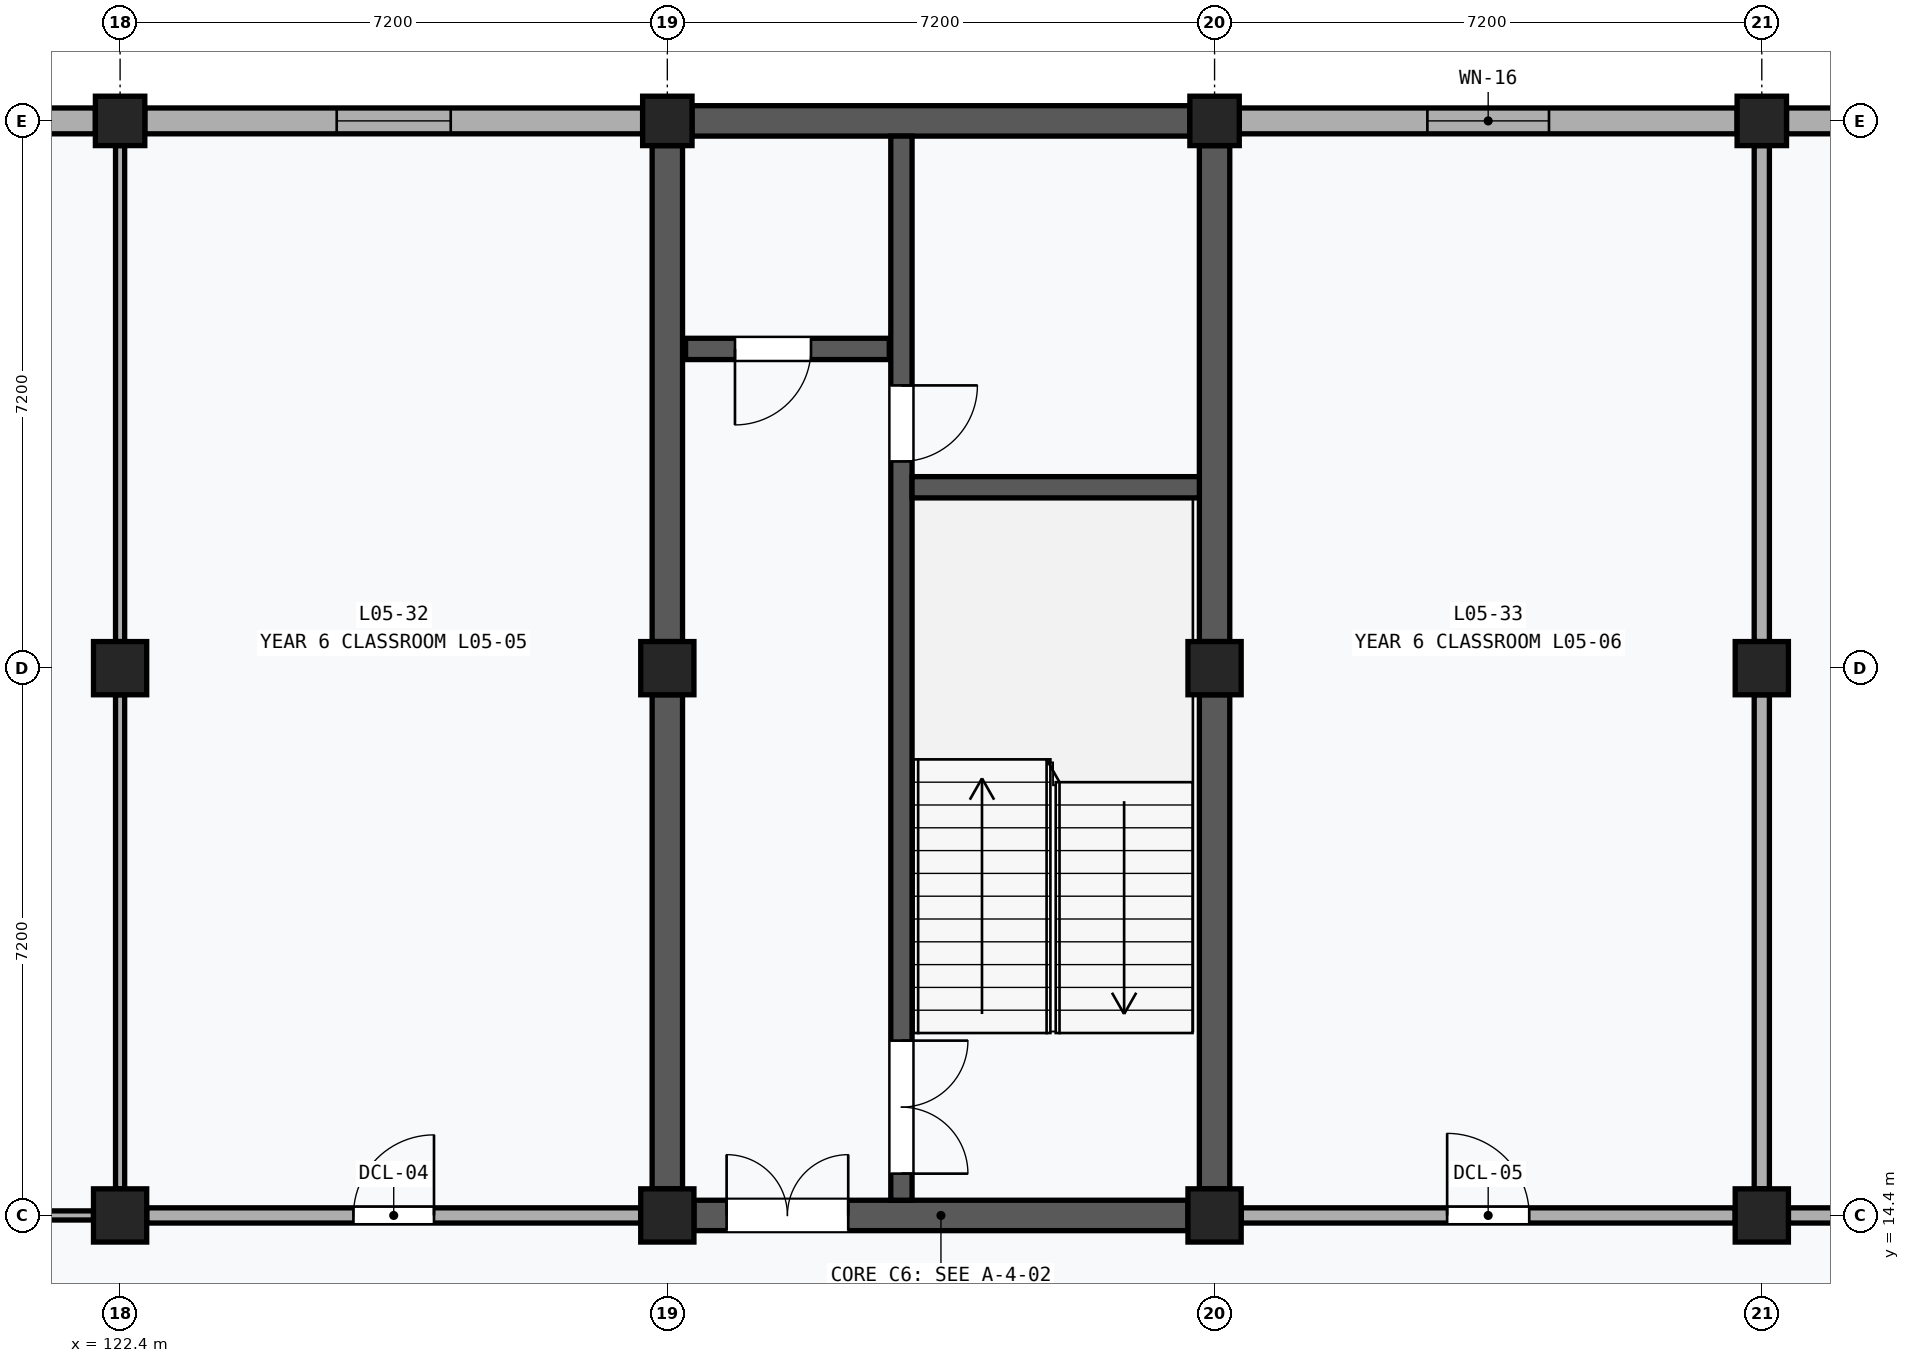
"""IFC4 building model, lengths in metres.
Left out: names, types, materials, properties, quantities, classifications, styles, units other than length and angle.
Written with IfcOpenShell. Run it as: python <this file> out.ifc"""

import sys

from ifc_helpers import new_model, si_unit, direction, frame, frame_2d, origin, origin_2d, place, context, subcontext, project, spatial, rectangle, extrude, element, fill, save


model = new_model("IFC4")
c1 = context("Model", 3, precision=1e-05, world=origin(), true_north=direction((0.0, 1.0)))
c2 = subcontext(c1, "Body", "Model", "MODEL_VIEW")
j1 = project(units=[si_unit("LENGTHUNIT", "METRE"), si_unit("PLANEANGLEUNIT", "RADIAN")], contexts=[c1])
p1 = place(None, origin())
s1 = spatial("IfcSite", under=j1, at=p1, CompositionType="ELEMENT")
p2 = place(p1, origin())
s2 = spatial("IfcBuilding", under=s1, at=p2, CompositionType="ELEMENT")
p3 = place(p2, frame((0.0, 0.0, 22.6)))
s3 = spatial("IfcBuildingStorey", under=s2, at=p3, CompositionType="ELEMENT", Elevation=22.6)
for number, where, z_axis, x_axis in (
    (1, (122.4, 14.4, 0.0), (0.0, 0.0, 1.0), (1.0, 0.0, 0.0)),
    (2, (122.4, 21.6, 0.0), (0.0, 0.0, 1.0), (1.0, 0.0, 0.0)),
):
    element("IfcColumn", number, at=place(p3, frame(where, z_axis=z_axis, x_axis=x_axis)), inside=s3, PredefinedType="COLUMN", context=c2, shape_type="SweptSolid", body=[
        extrude(rectangle(XDim=0.7, YDim=0.7, at=origin_2d()), origin(), (0.0, 0.0, 1.0), 4.0),
    ])
p4 = place(p3, frame((122.4, 28.8, 0.0), z_axis=(0.0, 0.0, 1.0), x_axis=(1.0, 0.0, 0.0)))
e3 = element("IfcColumn", 3, at=p4, inside=s3, PredefinedType="COLUMN", context=c2, shape_type="SweptSolid", body=[
    extrude(rectangle(XDim=0.65, YDim=0.65, at=origin_2d()), origin(), (0.0, 0.0, 1.0), 4.0),
])
for number, where, z_axis, x_axis in (
    (4, (129.6, 14.4, 0.0), (0.0, 0.0, 1.0), (1.0, 0.0, 0.0)),
    (5, (129.6, 21.6, 0.0), (0.0, 0.0, 1.0), (1.0, 0.0, 0.0)),
):
    element("IfcColumn", number, at=place(p3, frame(where, z_axis=z_axis, x_axis=x_axis)), inside=s3, PredefinedType="COLUMN", context=c2, shape_type="SweptSolid", body=[
        extrude(rectangle(XDim=0.7, YDim=0.7, at=origin_2d()), origin(), (0.0, 0.0, 1.0), 4.0),
    ])
p5 = place(p3, frame((129.6, 28.8, 0.0), z_axis=(0.0, 0.0, 1.0), x_axis=(1.0, 0.0, 0.0)))
e6 = element("IfcColumn", 6, at=p5, inside=s3, PredefinedType="COLUMN", context=c2, shape_type="SweptSolid", body=[
    extrude(rectangle(XDim=0.65, YDim=0.65, at=origin_2d()), origin(), (0.0, 0.0, 1.0), 4.0),
])
for number, where, z_axis, x_axis in (
    (7, (136.8, 14.4, 0.0), (0.0, 0.0, 1.0), (1.0, 0.0, 0.0)),
    (8, (136.8, 21.6, 0.0), (0.0, 0.0, 1.0), (1.0, 0.0, 0.0)),
):
    element("IfcColumn", number, at=place(p3, frame(where, z_axis=z_axis, x_axis=x_axis)), inside=s3, PredefinedType="COLUMN", context=c2, shape_type="SweptSolid", body=[
        extrude(rectangle(XDim=0.7, YDim=0.7, at=origin_2d()), origin(), (0.0, 0.0, 1.0), 4.0),
    ])
p6 = place(p3, frame((136.8, 28.8, 0.0), z_axis=(0.0, 0.0, 1.0), x_axis=(1.0, 0.0, 0.0)))
e9 = element("IfcColumn", 9, at=p6, inside=s3, PredefinedType="COLUMN", context=c2, shape_type="SweptSolid", body=[
    extrude(rectangle(XDim=0.65, YDim=0.65, at=origin_2d()), origin(), (0.0, 0.0, 1.0), 4.0),
])
for number, where, z_axis, x_axis in (
    (10, (144.0, 14.4, 0.0), (0.0, 0.0, 1.0), (1.0, 0.0, 0.0)),
    (11, (144.0, 21.6, 0.0), (0.0, 0.0, 1.0), (1.0, 0.0, 0.0)),
):
    element("IfcColumn", number, at=place(p3, frame(where, z_axis=z_axis, x_axis=x_axis)), inside=s3, PredefinedType="COLUMN", context=c2, shape_type="SweptSolid", body=[
        extrude(rectangle(XDim=0.7, YDim=0.7, at=origin_2d()), origin(), (0.0, 0.0, 1.0), 4.0),
    ])
p7 = place(p3, frame((144.0, 28.8, 0.0), z_axis=(0.0, 0.0, 1.0), x_axis=(1.0, 0.0, 0.0)))
e12 = element("IfcColumn", 12, at=p7, inside=s3, PredefinedType="COLUMN", context=c2, shape_type="SweptSolid", body=[
    extrude(rectangle(XDim=0.65, YDim=0.65, at=origin_2d()), origin(), (0.0, 0.0, 1.0), 4.0),
])
p8 = place(p3, frame((115.45, 28.8, 0.0), z_axis=(0.0, 0.0, 1.0), x_axis=(1.0, 0.0, 0.0)))
e13 = element("IfcWall", 13, at=p8, inside=s3, PredefinedType="SOLIDWALL", context=c2, shape_type="SweptSolid", body=[
    extrude(rectangle(XDim=6.625, YDim=0.34, at=frame_2d((3.312, 0.0))), origin(), (0.0, 0.0, 1.0), 3.12),
])
p9 = place(p8, frame((2.562, 0.0, 1.1)))
e14 = element("IfcOpeningElement", 14, at=p9, cuts=e13, PredefinedType="OPENING", context=c2, shape_type="SweptSolid", body=[
    extrude(rectangle(XDim=1.5, YDim=1.35, at=frame_2d((0.75, 0.675))), frame((0.0, 0.182, 0.0), z_axis=(0.0, -1.0, 0.0), x_axis=(1.0, 0.0, 0.0)), (0.0, 0.0, 1.0), 0.364),
])
p10 = place(p3, frame((122.725, 28.8, 0.0), z_axis=(0.0, 0.0, 1.0), x_axis=(1.0, 0.0, 0.0)))
e15 = element("IfcWall", 15, at=p10, inside=s3, PredefinedType="SOLIDWALL", context=c2, shape_type="SweptSolid", body=[
    extrude(rectangle(XDim=6.55, YDim=0.34, at=frame_2d((3.275, 0.0))), origin(), (0.0, 0.0, 1.0), 3.12),
])
p11 = place(p10, frame((2.525, 0.0, 1.1)))
e16 = element("IfcOpeningElement", 16, at=p11, cuts=e15, PredefinedType="OPENING", context=c2, shape_type="SweptSolid", body=[
    extrude(rectangle(XDim=1.5, YDim=1.35, at=frame_2d((0.75, 0.675))), frame((0.0, 0.182, 0.0), z_axis=(0.0, -1.0, 0.0), x_axis=(1.0, 0.0, 0.0)), (0.0, 0.0, 1.0), 0.364),
])
p12 = place(p3, frame((137.125, 28.8, 0.0), z_axis=(0.0, 0.0, 1.0), x_axis=(1.0, 0.0, 0.0)))
e17 = element("IfcWall", 17, at=p12, inside=s3, PredefinedType="SOLIDWALL", context=c2, shape_type="SweptSolid", body=[
    extrude(rectangle(XDim=6.55, YDim=0.34, at=frame_2d((3.275, 0.0))), origin(), (0.0, 0.0, 1.0), 3.12),
])
p13 = place(p12, frame((2.475, 0.0, 1.1)))
e18 = element("IfcOpeningElement", 18, at=p13, cuts=e17, PredefinedType="OPENING", context=c2, shape_type="SweptSolid", body=[
    extrude(rectangle(XDim=1.6, YDim=1.5, at=frame_2d((0.8, 0.75))), frame((0.0, 0.182, 0.0), z_axis=(0.0, -1.0, 0.0), x_axis=(1.0, 0.0, 0.0)), (0.0, 0.0, 1.0), 0.364),
])
p14 = place(p3, frame((144.325, 28.8, 0.0), z_axis=(0.0, 0.0, 1.0), x_axis=(1.0, 0.0, 0.0)))
e19 = element("IfcWall", 19, at=p14, inside=s3, PredefinedType="SOLIDWALL", context=c2, shape_type="SweptSolid", body=[
    extrude(rectangle(XDim=6.625, YDim=0.34, at=frame_2d((3.312, 0.0))), origin(), (0.0, 0.0, 1.0), 3.12),
])
p15 = place(p14, frame((2.363, 0.0, 1.1)))
e20 = element("IfcOpeningElement", 20, at=p15, cuts=e19, PredefinedType="OPENING", context=c2, shape_type="SweptSolid", body=[
    extrude(rectangle(XDim=1.9, YDim=1.5, at=frame_2d((0.95, 0.75))), frame((0.0, 0.182, 0.0), z_axis=(0.0, -1.0, 0.0), x_axis=(1.0, 0.0, 0.0)), (0.0, 0.0, 1.0), 0.364),
])
p16 = place(p3, frame((129.6, 14.75, 0.0), z_axis=(0.0, 0.0, 1.0), x_axis=(0.0, 1.0, 0.0)))
e21 = element("IfcWall", 21, at=p16, inside=s3, PredefinedType="SHEAR", context=c2, shape_type="SweptSolid", body=[
    extrude(rectangle(XDim=6.5, YDim=0.4, at=frame_2d((3.25, 0.0))), origin(), (0.0, 0.0, 1.0), 2.98),
])
p17 = place(p3, frame((129.6, 21.95, 0.0), z_axis=(0.0, 0.0, 1.0), x_axis=(0.0, 1.0, 0.0)))
e22 = element("IfcWall", 22, at=p17, inside=s3, PredefinedType="SHEAR", context=c2, shape_type="SweptSolid", body=[
    extrude(rectangle(XDim=6.525, YDim=0.4, at=frame_2d((3.263, 0.0))), origin(), (0.0, 0.0, 1.0), 2.98),
])
p18 = place(p3, frame((136.8, 14.75, 0.0), z_axis=(0.0, 0.0, 1.0), x_axis=(0.0, 1.0, 0.0)))
e23 = element("IfcWall", 23, at=p18, inside=s3, PredefinedType="SHEAR", context=c2, shape_type="SweptSolid", body=[
    extrude(rectangle(XDim=6.5, YDim=0.4, at=frame_2d((3.25, 0.0))), origin(), (0.0, 0.0, 1.0), 2.98),
])
p19 = place(p3, frame((136.8, 21.95, 0.0), z_axis=(0.0, 0.0, 1.0), x_axis=(0.0, 1.0, 0.0)))
e24 = element("IfcWall", 24, at=p19, inside=s3, PredefinedType="SHEAR", context=c2, shape_type="SweptSolid", body=[
    extrude(rectangle(XDim=6.525, YDim=0.4, at=frame_2d((3.263, 0.0))), origin(), (0.0, 0.0, 1.0), 2.98),
])
p20 = place(p3, frame((129.95, 14.4, 0.0), z_axis=(0.0, 0.0, 1.0), x_axis=(1.0, 0.0, 0.0)))
e25 = element("IfcWall", 25, at=p20, inside=s3, PredefinedType="SHEAR", context=c2, shape_type="SweptSolid", body=[
    extrude(rectangle(XDim=6.5, YDim=0.4, at=frame_2d((3.25, 0.0))), origin(), (0.0, 0.0, 1.0), 3.05),
])
p21 = place(p20, frame((0.43, 0.0, 0.0)))
e26 = element("IfcOpeningElement", 26, at=p21, cuts=e25, PredefinedType="OPENING", context=c2, shape_type="SweptSolid", body=[
    extrude(rectangle(XDim=1.6, YDim=2.2, at=frame_2d((0.8, 1.1))), frame((0.0, 0.212, 0.0), z_axis=(0.0, -1.0, 0.0), x_axis=(1.0, 0.0, 0.0)), (0.0, 0.0, 1.0), 0.424),
])
p22 = place(p3, frame((129.925, 28.8, 0.0), z_axis=(0.0, 0.0, 1.0), x_axis=(1.0, 0.0, 0.0)))
e27 = element("IfcWall", 27, at=p22, inside=s3, PredefinedType="SHEAR", context=c2, shape_type="SweptSolid", body=[
    extrude(rectangle(XDim=6.55, YDim=0.4, at=frame_2d((3.275, 0.0))), origin(), (0.0, 0.0, 1.0), 3.12),
])
p23 = place(p3, frame((132.68, 14.6, 0.0), z_axis=(0.0, 0.0, 1.0), x_axis=(0.0, 1.0, 0.0)))
e28 = element("IfcWall", 28, at=p23, inside=s3, PredefinedType="SHEAR", context=c2, shape_type="SweptSolid", body=[
    extrude(rectangle(XDim=14.0, YDim=0.28, at=frame_2d((7.0, 0.0))), origin(), (0.0, 0.0, 1.0), 3.75),
])
p24 = place(p23, frame((0.35, 0.0, 0.0)))
e29 = element("IfcOpeningElement", 29, at=p24, cuts=e28, PredefinedType="OPENING", context=c2, shape_type="SweptSolid", body=[
    extrude(rectangle(XDim=1.75, YDim=2.15, at=frame_2d((0.875, 1.075))), frame((0.0, 0.152, 0.0), z_axis=(0.0, -1.0, 0.0), x_axis=(1.0, 0.0, 0.0)), (0.0, 0.0, 1.0), 0.304),
])
p25 = place(p23, frame((9.72, 0.0, 0.0)))
e30 = element("IfcOpeningElement", 30, at=p25, cuts=e28, PredefinedType="OPENING", context=c2, shape_type="SweptSolid", body=[
    extrude(rectangle(XDim=1.0, YDim=2.15, at=frame_2d((0.5, 1.075))), frame((0.0, 0.152, 0.0), z_axis=(0.0, -1.0, 0.0), x_axis=(1.0, 0.0, 0.0)), (0.0, 0.0, 1.0), 0.304),
])
p26 = place(p3, frame((132.82, 23.98, 0.0), z_axis=(0.0, 0.0, 1.0), x_axis=(1.0, 0.0, 0.0)))
e31 = element("IfcWall", 31, at=p26, inside=s3, PredefinedType="SHEAR", context=c2, shape_type="SweptSolid", body=[
    extrude(rectangle(XDim=3.78, YDim=0.28, at=frame_2d((1.89, 0.0))), origin(), (0.0, 0.0, 1.0), 3.75),
])
p27 = place(p3, frame((129.84, 25.8, 0.0), z_axis=(0.0, 0.0, 1.0), x_axis=(1.0, 0.0, 0.0)))
e32 = element("IfcWall", 32, at=p27, inside=s3, PredefinedType="SHEAR", context=c2, shape_type="SweptSolid", body=[
    extrude(rectangle(XDim=2.68, YDim=0.28, at=frame_2d((1.34, 0.0))), origin(), (0.0, 0.0, 1.0), 3.75),
])
p28 = place(p27, frame((0.65, 0.0, 0.0)))
e33 = element("IfcOpeningElement", 33, at=p28, cuts=e32, PredefinedType="OPENING", context=c2, shape_type="SweptSolid", body=[
    extrude(rectangle(XDim=1.0, YDim=2.15, at=frame_2d((0.5, 1.075))), frame((0.0, 0.152, 0.0), z_axis=(0.0, -1.0, 0.0), x_axis=(1.0, 0.0, 0.0)), (0.0, 0.0, 1.0), 0.304),
])
p29 = place(p3, frame((115.55, 14.4, 0.0), z_axis=(0.0, 0.0, 1.0), x_axis=(1.0, 0.0, 0.0)))
e34 = element("IfcWall", 34, at=p29, inside=s3, PredefinedType="MOVABLE", context=c2, shape_type="SweptSolid", body=[
    extrude(rectangle(XDim=6.5, YDim=0.12, at=frame_2d((3.25, 0.0))), origin(), (0.0, 0.0, 1.0), 2.98),
])
p30 = place(p29, frame((2.73, 0.0, 0.0)))
e35 = element("IfcOpeningElement", 35, at=p30, cuts=e34, PredefinedType="OPENING", context=c2, shape_type="SweptSolid", body=[
    extrude(rectangle(XDim=1.04, YDim=2.14, at=frame_2d((0.52, 1.07))), frame((0.0, 0.072, 0.0), z_axis=(0.0, -1.0, 0.0), x_axis=(1.0, 0.0, 0.0)), (0.0, 0.0, 1.0), 0.144),
])
p31 = place(p3, frame((122.4, 14.75, 0.0), z_axis=(0.0, 0.0, 1.0), x_axis=(0.0, 1.0, 0.0)))
e36 = element("IfcWall", 36, at=p31, inside=s3, PredefinedType="MOVABLE", context=c2, shape_type="SweptSolid", body=[
    extrude(rectangle(XDim=6.5, YDim=0.12, at=frame_2d((3.25, 0.0))), origin(), (0.0, 0.0, 1.0), 2.98),
])
p32 = place(p3, frame((122.4, 21.95, 0.0), z_axis=(0.0, 0.0, 1.0), x_axis=(0.0, 1.0, 0.0)))
e37 = element("IfcWall", 37, at=p32, inside=s3, PredefinedType="MOVABLE", context=c2, shape_type="SweptSolid", body=[
    extrude(rectangle(XDim=6.525, YDim=0.12, at=frame_2d((3.263, 0.0))), origin(), (0.0, 0.0, 1.0), 2.98),
])
p33 = place(p3, frame((122.75, 14.4, 0.0), z_axis=(0.0, 0.0, 1.0), x_axis=(1.0, 0.0, 0.0)))
e38 = element("IfcWall", 38, at=p33, inside=s3, PredefinedType="PARTITIONING", context=c2, shape_type="SweptSolid", body=[
    extrude(rectangle(XDim=6.5, YDim=0.2, at=frame_2d((3.25, 0.0))), origin(), (0.0, 0.0, 1.0), 2.98),
])
p34 = place(p33, frame((2.72, 0.0, 0.0)))
e39 = element("IfcOpeningElement", 39, at=p34, cuts=e38, PredefinedType="OPENING", context=c2, shape_type="SweptSolid", body=[
    extrude(rectangle(XDim=1.06, YDim=2.16, at=frame_2d((0.53, 1.08))), frame((0.0, 0.112, 0.0), z_axis=(0.0, -1.0, 0.0), x_axis=(1.0, 0.0, 0.0)), (0.0, 0.0, 1.0), 0.224),
])
p35 = place(p3, frame((137.15, 14.4, 0.0), z_axis=(0.0, 0.0, 1.0), x_axis=(1.0, 0.0, 0.0)))
e40 = element("IfcWall", 40, at=p35, inside=s3, PredefinedType="PARTITIONING", context=c2, shape_type="SweptSolid", body=[
    extrude(rectangle(XDim=6.5, YDim=0.2, at=frame_2d((3.25, 0.0))), origin(), (0.0, 0.0, 1.0), 2.98),
])
p36 = place(p35, frame((2.71, 0.0, 0.0)))
e41 = element("IfcOpeningElement", 41, at=p36, cuts=e40, PredefinedType="OPENING", context=c2, shape_type="SweptSolid", body=[
    extrude(rectangle(XDim=1.08, YDim=2.18, at=frame_2d((0.54, 1.09))), frame((0.0, 0.112, 0.0), z_axis=(0.0, -1.0, 0.0), x_axis=(1.0, 0.0, 0.0)), (0.0, 0.0, 1.0), 0.224),
])
p37 = place(p3, frame((144.0, 14.75, 0.0), z_axis=(0.0, 0.0, 1.0), x_axis=(0.0, 1.0, 0.0)))
e42 = element("IfcWall", 42, at=p37, inside=s3, PredefinedType="PARTITIONING", context=c2, shape_type="SweptSolid", body=[
    extrude(rectangle(XDim=6.5, YDim=0.2, at=frame_2d((3.25, 0.0))), origin(), (0.0, 0.0, 1.0), 2.98),
])
p38 = place(p3, frame((144.0, 21.95, 0.0), z_axis=(0.0, 0.0, 1.0), x_axis=(0.0, 1.0, 0.0)))
e43 = element("IfcWall", 43, at=p38, inside=s3, PredefinedType="PARTITIONING", context=c2, shape_type="SweptSolid", body=[
    extrude(rectangle(XDim=6.525, YDim=0.2, at=frame_2d((3.263, 0.0))), origin(), (0.0, 0.0, 1.0), 2.98),
])
p39 = place(p3, frame((144.35, 14.4, 0.0), z_axis=(0.0, 0.0, 1.0), x_axis=(1.0, 0.0, 0.0)))
e44 = element("IfcWall", 44, at=p39, inside=s3, PredefinedType="PARTITIONING", context=c2, shape_type="SweptSolid", body=[
    extrude(rectangle(XDim=6.525, YDim=0.2, at=frame_2d((3.262, 0.0))), origin(), (0.0, 0.0, 1.0), 2.98),
])
p40 = place(p39, frame((2.702, 0.0, 0.0)))
e45 = element("IfcOpeningElement", 45, at=p40, cuts=e44, PredefinedType="OPENING", context=c2, shape_type="SweptSolid", body=[
    extrude(rectangle(XDim=1.12, YDim=2.2, at=frame_2d((0.56, 1.1))), frame((0.0, 0.112, 0.0), z_axis=(0.0, -1.0, 0.0), x_axis=(1.0, 0.0, 0.0)), (0.0, 0.0, 1.0), 0.224),
])
p41 = place(p11, origin())
e46 = element("IfcWindow", 46, at=p41, inside=s3, PartitioningType="SINGLE_PANEL", PredefinedType="WINDOW", context=c2, shape_type="SweptSolid", body=[
    extrude(rectangle(XDim=1.5, YDim=1.35, at=frame_2d((0.75, 0.675))), frame((0.0, 0.03, 0.0), z_axis=(0.0, -1.0, 0.0), x_axis=(1.0, 0.0, 0.0)), (0.0, 0.0, 1.0), 0.06),
])
fill(e16, e46)
p42 = place(p13, origin())
e47 = element("IfcWindow", 47, at=p42, inside=s3, PartitioningType="SINGLE_PANEL", PredefinedType="WINDOW", context=c2, shape_type="SweptSolid", body=[
    extrude(rectangle(XDim=1.6, YDim=1.5, at=frame_2d((0.8, 0.75))), frame((0.0, 0.03, 0.0), z_axis=(0.0, -1.0, 0.0), x_axis=(1.0, 0.0, 0.0)), (0.0, 0.0, 1.0), 0.06),
])
fill(e18, e47)
p43 = place(p21, origin())
e48 = element("IfcDoor", 48, at=p43, inside=s3, OperationType="DOUBLE_DOOR_SINGLE_SWING", PredefinedType="DOOR", context=c2, shape_type="SweptSolid", body=[
    extrude(rectangle(XDim=1.6, YDim=2.2, at=frame_2d((0.8, 1.1))), frame((0.0, 0.025, 0.0), z_axis=(0.0, -1.0, 0.0), x_axis=(1.0, 0.0, 0.0)), (0.0, 0.0, 1.0), 0.05),
])
fill(e26, e48)
p44 = place(p24, frame((1.75, 0.0, 0.0), z_axis=(0.0, 0.0, 1.0), x_axis=(-1.0, 0.0, 0.0)))
e49 = element("IfcDoor", 49, at=p44, inside=s3, OperationType="DOUBLE_DOOR_SINGLE_SWING", PredefinedType="DOOR", context=c2, shape_type="SweptSolid", body=[
    extrude(rectangle(XDim=1.75, YDim=2.15, at=frame_2d((0.875, 1.075))), frame((0.0, 0.025, 0.0), z_axis=(0.0, -1.0, 0.0), x_axis=(1.0, 0.0, 0.0)), (0.0, 0.0, 1.0), 0.05),
])
fill(e29, e49)
p45 = place(p25, frame((1.0, 0.0, 0.0), z_axis=(0.0, 0.0, 1.0), x_axis=(-1.0, 0.0, 0.0)))
e50 = element("IfcDoor", 50, at=p45, inside=s3, OperationType="SINGLE_SWING_LEFT", PredefinedType="DOOR", context=c2, shape_type="SweptSolid", body=[
    extrude(rectangle(XDim=1.0, YDim=2.15, at=frame_2d((0.5, 1.075))), frame((0.0, 0.025, 0.0), z_axis=(0.0, -1.0, 0.0), x_axis=(1.0, 0.0, 0.0)), (0.0, 0.0, 1.0), 0.05),
])
fill(e30, e50)
p46 = place(p28, frame((1.0, 0.0, 0.0), z_axis=(0.0, 0.0, 1.0), x_axis=(-1.0, 0.0, 0.0)))
e51 = element("IfcDoor", 51, at=p46, inside=s3, OperationType="SINGLE_SWING_RIGHT", PredefinedType="DOOR", context=c2, shape_type="SweptSolid", body=[
    extrude(rectangle(XDim=1.0, YDim=2.15, at=frame_2d((0.5, 1.075))), frame((0.0, 0.025, 0.0), z_axis=(0.0, -1.0, 0.0), x_axis=(1.0, 0.0, 0.0)), (0.0, 0.0, 1.0), 0.05),
])
fill(e33, e51)
p47 = place(p34, origin())
e52 = element("IfcDoor", 52, at=p47, inside=s3, OperationType="SINGLE_SWING_RIGHT", PredefinedType="DOOR", context=c2, shape_type="SweptSolid", body=[
    extrude(rectangle(XDim=1.06, YDim=2.16, at=frame_2d((0.53, 1.08))), frame((0.0, 0.025, 0.0), z_axis=(0.0, -1.0, 0.0), x_axis=(1.0, 0.0, 0.0)), (0.0, 0.0, 1.0), 0.05),
])
fill(e39, e52)
p48 = place(p36, origin())
e53 = element("IfcDoor", 53, at=p48, inside=s3, OperationType="SINGLE_SWING_LEFT", PredefinedType="DOOR", context=c2, shape_type="SweptSolid", body=[
    extrude(rectangle(XDim=1.08, YDim=2.18, at=frame_2d((0.54, 1.09))), frame((0.0, 0.025, 0.0), z_axis=(0.0, -1.0, 0.0), x_axis=(1.0, 0.0, 0.0)), (0.0, 0.0, 1.0), 0.05),
])
fill(e41, e53)
save(model, sys.argv[1])
